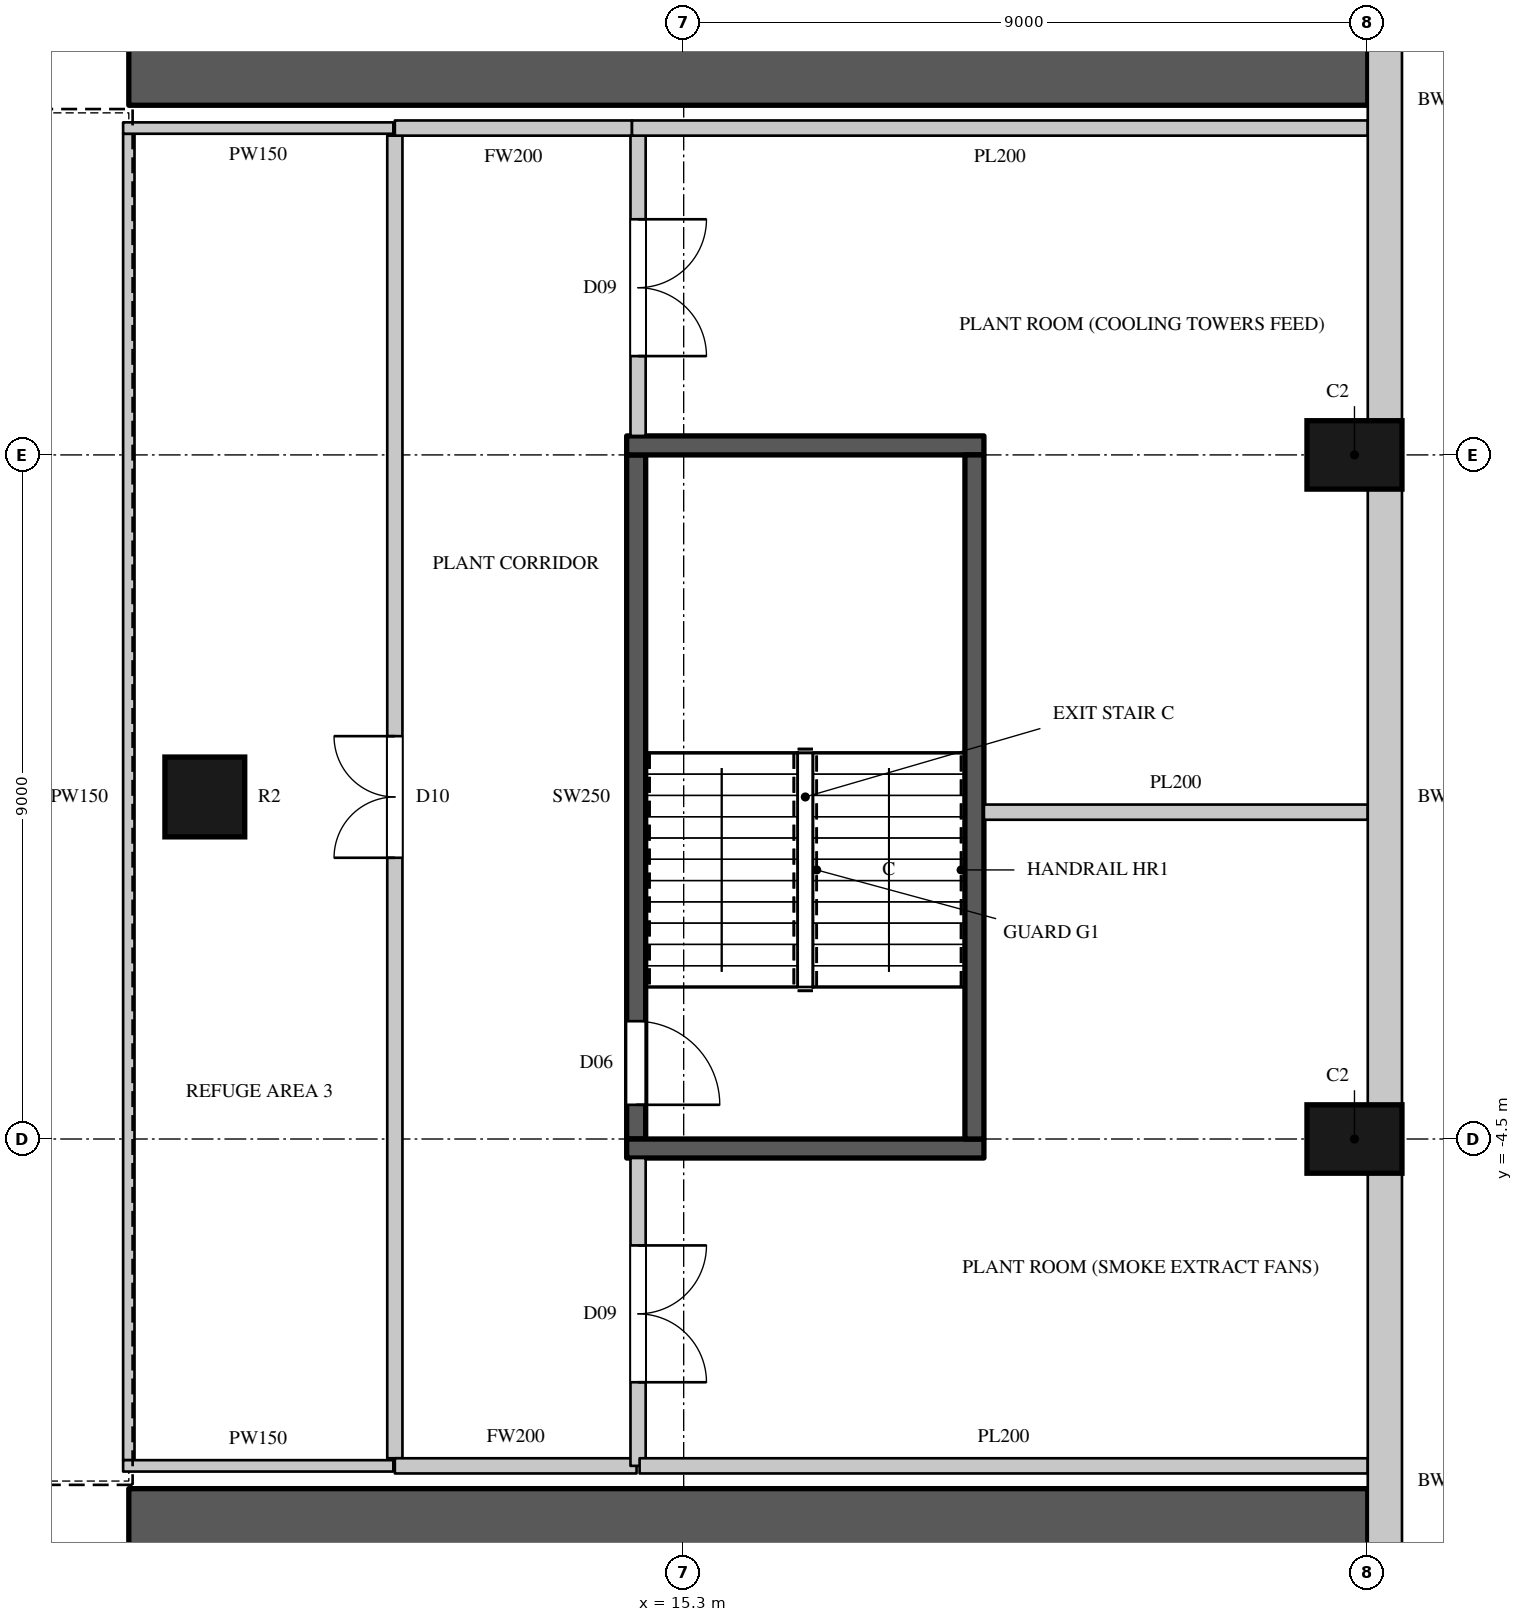
"""IFC4 building model, lengths in metres.
Left out: names, types, materials, properties, quantities, classifications, styles, units other than length and angle.
Written with IfcOpenShell. Run it as: python <this file> out.ifc"""

import sys

from ifc_helpers import new_model, si_unit, direction, frame, frame_2d, origin, origin_2d, place, context, subcontext, project, spatial, rectangle, circle, extrude, element, fill, save


model = new_model("IFC4")
c1 = context("Model", 3, precision=1e-05, world=origin(), true_north=direction((0.0, 1.0)))
c2 = subcontext(c1, "Body", "Model", "MODEL_VIEW")
j1 = project(units=[si_unit("LENGTHUNIT", "METRE"), si_unit("PLANEANGLEUNIT", "RADIAN")], contexts=[c1])
p1 = place(None, origin())
s1 = spatial("IfcSite", under=j1, at=p1, CompositionType="ELEMENT")
p2 = place(p1, origin())
s2 = spatial("IfcBuilding", under=s1, at=p2, CompositionType="ELEMENT")
p3 = place(p2, frame((0.0, 0.0, 152.5)))
s3 = spatial("IfcBuildingStorey", under=s2, at=p3, CompositionType="ELEMENT", Elevation=152.5)
for number, where, z_axis, x_axis in (
    (1, (24.125, -4.5, 0.0), (0.0, 0.0, 1.0), (0.0, 1.0, 0.0)),
    (2, (24.125, 4.5, 0.0), (0.0, 0.0, 1.0), (0.0, 1.0, 0.0)),
):
    element("IfcColumn", number, at=place(p3, frame(where, z_axis=z_axis, x_axis=x_axis)), inside=s3, PredefinedType="COLUMN", context=c2, shape_type="SweptSolid", body=[
        extrude(rectangle(XDim=0.9, YDim=1.25, at=origin_2d()), origin(), (0.0, 0.0, 1.0), 8.0),
    ])
p4 = place(p3, frame((9.0, 0.0, 0.0), z_axis=(0.0, 0.0, 1.0), x_axis=(1.0, 0.0, 0.0)))
e3 = element("IfcColumn", 3, at=p4, inside=s3, PredefinedType="COLUMN", context=c2, shape_type="SweptSolid", body=[
    extrude(circle(Radius=0.525, at=origin_2d()), origin(), (0.0, 0.0, 1.0), 8.0),
])
for number, where, z_axis, x_axis in (
    (4, (8.0, -9.6, 0.0), (0.0, 0.0, 1.0), (1.0, 0.0, 0.0)),
    (5, (8.0, 9.6, 0.0), (0.0, 0.0, 1.0), (1.0, 0.0, 0.0)),
):
    element("IfcWall", number, at=place(p3, frame(where, z_axis=z_axis, x_axis=x_axis)), inside=s3, PredefinedType="SOLIDWALL", context=c2, shape_type="SweptSolid", body=[
        extrude(rectangle(XDim=16.3, YDim=1.0, at=frame_2d((8.15, 0.0))), origin(), (0.0, 0.0, 1.0), 7.7),
    ])
p5 = place(p3, frame((24.525, -13.05, 0.0), z_axis=(0.0, 0.0, 1.0), x_axis=(0.0, 1.0, 0.0)))
e6 = element("IfcWall", 6, at=p5, inside=s3, PredefinedType="SOLIDWALL", context=c2, shape_type="SweptSolid", body=[
    extrude(rectangle(XDim=8.1, YDim=0.45, at=frame_2d((4.05, 0.0))), origin(), (0.0, 0.0, 1.0), 6.4),
])
p6 = place(p3, frame((24.525, -4.05, 0.0), z_axis=(0.0, 0.0, 1.0), x_axis=(0.0, 1.0, 0.0)))
e7 = element("IfcWall", 7, at=p6, inside=s3, PredefinedType="SOLIDWALL", context=c2, shape_type="SweptSolid", body=[
    extrude(rectangle(XDim=8.1, YDim=0.45, at=frame_2d((4.05, 0.0))), origin(), (0.0, 0.0, 1.0), 7.7),
])
p7 = place(p3, frame((24.525, 4.95, 0.0), z_axis=(0.0, 0.0, 1.0), x_axis=(0.0, 1.0, 0.0)))
e8 = element("IfcWall", 8, at=p7, inside=s3, PredefinedType="SOLIDWALL", context=c2, shape_type="SweptSolid", body=[
    extrude(rectangle(XDim=8.439, YDim=0.45, at=frame_2d((4.219, 0.0))), origin(), (0.0, 0.0, 1.0), 6.4),
])
p8 = place(p3, frame((11.5, -8.7, 0.0), z_axis=(0.0, 0.0, 1.0), x_axis=(0.0, 1.0, 0.0)))
e9 = element("IfcWall", 9, at=p8, inside=s3, PredefinedType="PARTITIONING", context=c2, shape_type="SweptSolid", body=[
    extrude(rectangle(XDim=17.4, YDim=0.2, at=frame_2d((8.7, 0.0))), origin(), (0.0, 0.0, 1.0), 7.7),
])
p9 = place(p8, frame((7.9, 0.0, 0.0)))
e10 = element("IfcOpeningElement", 10, at=p9, cuts=e9, PredefinedType="OPENING", context=c2, shape_type="SweptSolid", body=[
    extrude(rectangle(XDim=1.6, YDim=2.4, at=frame_2d((0.8, 1.2))), frame((0.0, 0.11, 0.0), z_axis=(0.0, -1.0, 0.0), x_axis=(1.0, 0.0, 0.0)), (0.0, 0.0, 1.0), 0.22),
])
p10 = place(p3, frame((11.5, -8.8, 0.0), z_axis=(0.0, 0.0, 1.0), x_axis=(1.0, 0.0, 0.0)))
e11 = element("IfcWall", 11, at=p10, inside=s3, PredefinedType="PARTITIONING", context=c2, shape_type="SweptSolid", body=[
    extrude(rectangle(XDim=3.18, YDim=0.2, at=frame_2d((1.59, 0.0))), origin(), (0.0, 0.0, 1.0), 7.7),
])
p11 = place(p3, frame((11.5, 8.8, 0.0), z_axis=(0.0, 0.0, 1.0), x_axis=(1.0, 0.0, 0.0)))
e12 = element("IfcWall", 12, at=p11, inside=s3, PredefinedType="PARTITIONING", context=c2, shape_type="SweptSolid", body=[
    extrude(rectangle(XDim=3.12, YDim=0.2, at=frame_2d((1.56, 0.0))), origin(), (0.0, 0.0, 1.0), 7.7),
])
p12 = place(p3, frame((8.0, -8.725, 0.0), z_axis=(0.0, 0.0, 1.0), x_axis=(0.0, 1.0, 0.0)))
e13 = element("IfcWall", 13, at=p12, inside=s3, PredefinedType="PARTITIONING", context=c2, shape_type="SweptSolid", body=[
    extrude(rectangle(XDim=17.45, YDim=0.15, at=frame_2d((8.725, 0.0))), origin(), (0.0, 0.0, 1.0), 7.7),
])
for number, where, z_axis, x_axis in (
    (14, (7.925, -8.8, 0.0), (0.0, 0.0, 1.0), (1.0, 0.0, 0.0)),
    (15, (7.925, 8.8, 0.0), (0.0, 0.0, 1.0), (1.0, 0.0, 0.0)),
):
    element("IfcWall", number, at=place(p3, frame(where, z_axis=z_axis, x_axis=x_axis)), inside=s3, PredefinedType="PARTITIONING", context=c2, shape_type="SweptSolid", body=[
        extrude(rectangle(XDim=3.555, YDim=0.15, at=frame_2d((1.777, 0.0))), origin(), (0.0, 0.0, 1.0), 7.7),
    ])
p13 = place(p3, frame((14.7, -8.8, 0.0), z_axis=(0.0, 0.0, 1.0), x_axis=(0.0, 1.0, 0.0)))
e16 = element("IfcWall", 16, at=p13, inside=s3, PredefinedType="PARTITIONING", context=c2, shape_type="SweptSolid", body=[
    extrude(rectangle(XDim=4.05, YDim=0.2, at=frame_2d((2.025, 0.0))), origin(), (0.0, 0.0, 1.0), 7.7),
])
p14 = place(p13, frame((1.1, 0.0, 0.0)))
e17 = element("IfcOpeningElement", 17, at=p14, cuts=e16, PredefinedType="OPENING", context=c2, shape_type="SweptSolid", body=[
    extrude(rectangle(XDim=1.8, YDim=2.4, at=frame_2d((0.9, 1.2))), frame((0.0, 0.11, 0.0), z_axis=(0.0, -1.0, 0.0), x_axis=(1.0, 0.0, 0.0)), (0.0, 0.0, 1.0), 0.22),
])
p15 = place(p3, frame((14.7, 4.75, 0.0), z_axis=(0.0, 0.0, 1.0), x_axis=(0.0, 1.0, 0.0)))
e18 = element("IfcWall", 18, at=p15, inside=s3, PredefinedType="PARTITIONING", context=c2, shape_type="SweptSolid", body=[
    extrude(rectangle(XDim=3.95, YDim=0.2, at=frame_2d((1.975, 0.0))), origin(), (0.0, 0.0, 1.0), 7.7),
])
p16 = place(p15, frame((1.05, 0.0, 0.0)))
e19 = element("IfcOpeningElement", 19, at=p16, cuts=e18, PredefinedType="OPENING", context=c2, shape_type="SweptSolid", body=[
    extrude(rectangle(XDim=1.8, YDim=2.4, at=frame_2d((0.9, 1.2))), frame((0.0, 0.11, 0.0), z_axis=(0.0, -1.0, 0.0), x_axis=(1.0, 0.0, 0.0)), (0.0, 0.0, 1.0), 0.22),
])
p17 = place(p3, frame((14.72, -8.8, 0.0), z_axis=(0.0, 0.0, 1.0), x_axis=(1.0, 0.0, 0.0)))
e20 = element("IfcWall", 20, at=p17, inside=s3, PredefinedType="PARTITIONING", context=c2, shape_type="SweptSolid", body=[
    extrude(rectangle(XDim=9.58, YDim=0.2, at=frame_2d((4.79, 0.0))), origin(), (0.0, 0.0, 1.0), 7.7),
])
p18 = place(p3, frame((14.62, 8.8, 0.0), z_axis=(0.0, 0.0, 1.0), x_axis=(1.0, 0.0, 0.0)))
e21 = element("IfcWall", 21, at=p18, inside=s3, PredefinedType="PARTITIONING", context=c2, shape_type="SweptSolid", body=[
    extrude(rectangle(XDim=9.68, YDim=0.2, at=frame_2d((4.84, 0.0))), origin(), (0.0, 0.0, 1.0), 7.7),
])
p19 = place(p3, frame((19.25, -0.2, 0.0), z_axis=(0.0, 0.0, 1.0), x_axis=(1.0, 0.0, 0.0)))
e22 = element("IfcWall", 22, at=p19, inside=s3, PredefinedType="PARTITIONING", context=c2, shape_type="SweptSolid", body=[
    extrude(rectangle(XDim=5.05, YDim=0.2, at=frame_2d((2.525, 0.0))), origin(), (0.0, 0.0, 1.0), 7.7),
])
p20 = place(p3, frame((14.675, -4.5, 0.0), z_axis=(0.0, 0.0, 1.0), x_axis=(0.0, 1.0, 0.0)))
e23 = element("IfcWall", 23, at=p20, inside=s3, PredefinedType="SHEAR", context=c2, shape_type="SweptSolid", body=[
    extrude(rectangle(XDim=9.0, YDim=0.25, at=frame_2d((4.5, 0.0))), origin(), (0.0, 0.0, 1.0), 7.7),
])
p21 = place(p20, frame((0.45, 0.0, 0.0)))
e24 = element("IfcOpeningElement", 24, at=p21, cuts=e23, PredefinedType="OPENING", context=c2, shape_type="SweptSolid", body=[
    extrude(rectangle(XDim=1.1, YDim=2.2, at=frame_2d((0.55, 1.1))), frame((0.0, 0.135, 0.0), z_axis=(0.0, -1.0, 0.0), x_axis=(1.0, 0.0, 0.0)), (0.0, 0.0, 1.0), 0.27),
])
for number, where, z_axis, x_axis in (
    (25, (14.55, -4.625, 0.0), (0.0, 0.0, 1.0), (1.0, 0.0, 0.0)),
    (26, (14.55, 4.625, 0.0), (0.0, 0.0, 1.0), (1.0, 0.0, 0.0)),
):
    element("IfcWall", number, at=place(p3, frame(where, z_axis=z_axis, x_axis=x_axis)), inside=s3, PredefinedType="SHEAR", context=c2, shape_type="SweptSolid", body=[
        extrude(rectangle(XDim=4.7, YDim=0.25, at=frame_2d((2.35, 0.0))), origin(), (0.0, 0.0, 1.0), 7.7),
    ])
p22 = place(p3, frame((19.125, -4.5, 0.0), z_axis=(0.0, 0.0, 1.0), x_axis=(0.0, 1.0, 0.0)))
e27 = element("IfcWall", 27, at=p22, inside=s3, PredefinedType="SHEAR", context=c2, shape_type="SweptSolid", body=[
    extrude(rectangle(XDim=9.0, YDim=0.25, at=frame_2d((4.5, 0.0))), origin(), (0.0, 0.0, 1.0), 7.7),
])
p23 = place(p9, origin())
e28 = element("IfcDoor", 28, at=p23, inside=s3, OperationType="DOUBLE_DOOR_SINGLE_SWING", PredefinedType="DOOR", context=c2, shape_type="SweptSolid", body=[
    extrude(rectangle(XDim=1.6, YDim=2.4, at=frame_2d((0.8, 1.2))), frame((0.0, 0.025, 0.0), z_axis=(0.0, -1.0, 0.0), x_axis=(1.0, 0.0, 0.0)), (0.0, 0.0, 1.0), 0.05),
])
fill(e10, e28)
p24 = place(p16, origin())
e29 = element("IfcDoor", 29, at=p24, inside=s3, OperationType="DOUBLE_DOOR_SINGLE_SWING", PredefinedType="DOOR", context=c2, shape_type="SweptSolid", body=[
    extrude(rectangle(XDim=1.8, YDim=2.4, at=frame_2d((0.9, 1.2))), frame((0.0, 0.025, 0.0), z_axis=(0.0, -1.0, 0.0), x_axis=(1.0, 0.0, 0.0)), (0.0, 0.0, 1.0), 0.05),
])
fill(e19, e29)
p25 = place(p14, origin())
e30 = element("IfcDoor", 30, at=p25, inside=s3, OperationType="DOUBLE_DOOR_SINGLE_SWING", PredefinedType="DOOR", context=c2, shape_type="SweptSolid", body=[
    extrude(rectangle(XDim=1.8, YDim=2.4, at=frame_2d((0.9, 1.2))), frame((0.0, 0.025, 0.0), z_axis=(0.0, -1.0, 0.0), x_axis=(1.0, 0.0, 0.0)), (0.0, 0.0, 1.0), 0.05),
])
fill(e17, e30)
p26 = place(p21, origin())
e31 = element("IfcDoor", 31, at=p26, inside=s3, OperationType="SINGLE_SWING_RIGHT", PredefinedType="DOOR", context=c2, shape_type="SweptSolid", body=[
    extrude(rectangle(XDim=1.1, YDim=2.2, at=frame_2d((0.55, 1.1))), frame((0.0, 0.025, 0.0), z_axis=(0.0, -1.0, 0.0), x_axis=(1.0, 0.0, 0.0)), (0.0, 0.0, 1.0), 0.05),
])
fill(e24, e31)
save(model, sys.argv[1])
